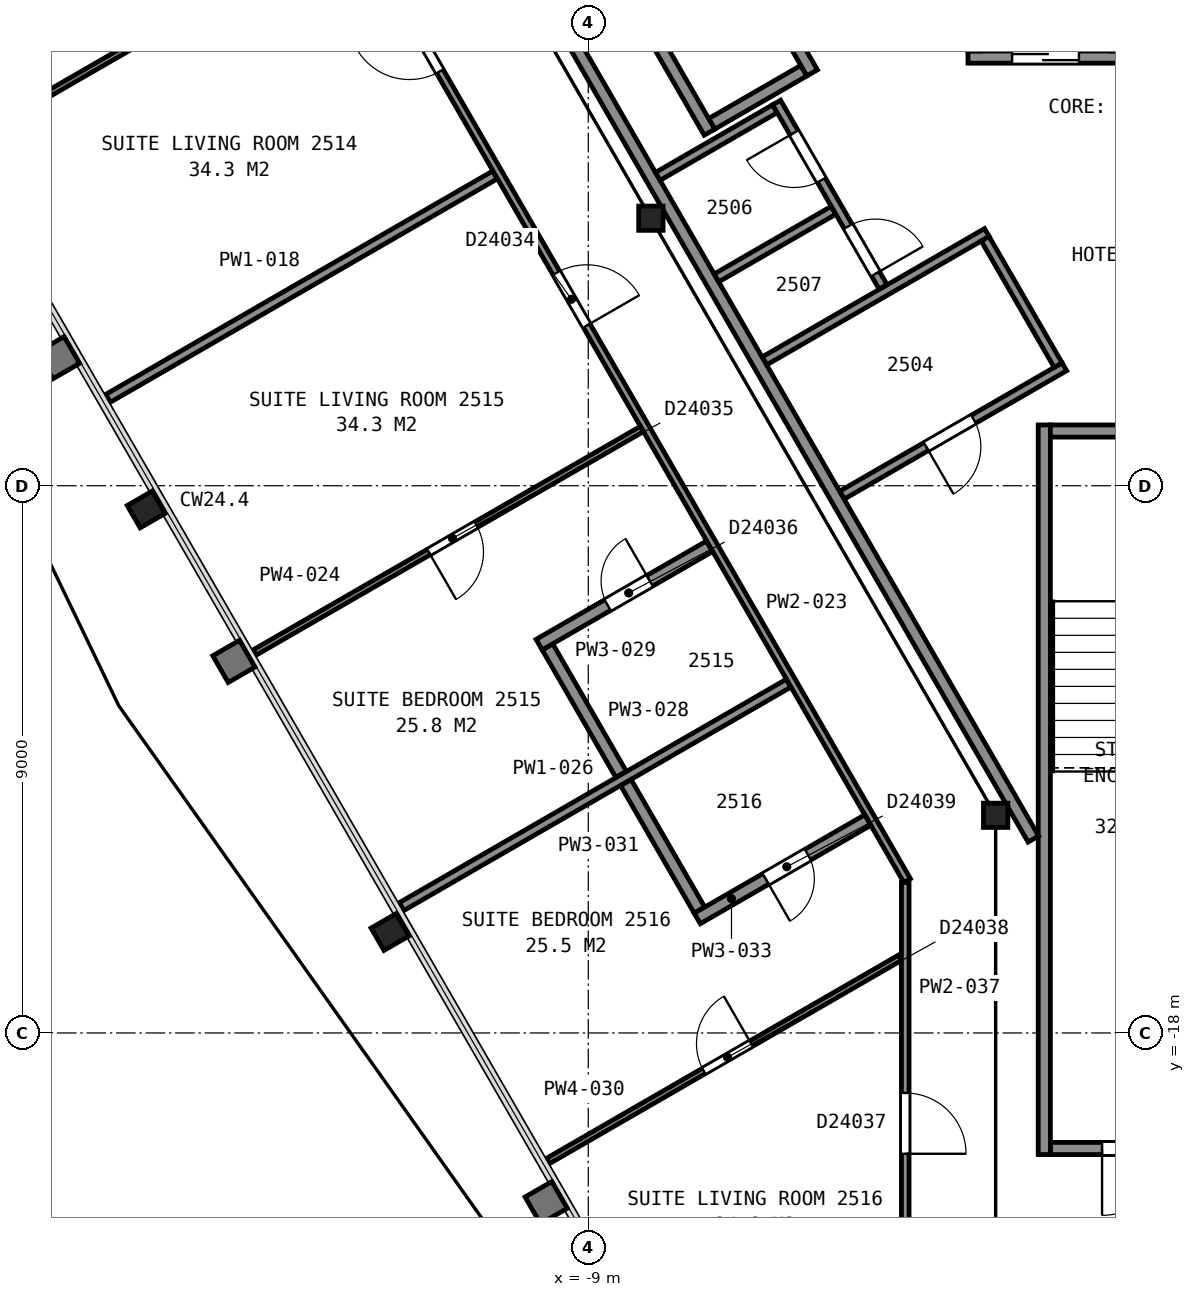
"""IFC4 building model, lengths in metres.
Left out: names, types, materials, properties, quantities, classifications, styles, units other than length and angle.
Written with IfcOpenShell. Run it as: python <this file> out.ifc"""

import sys

from ifc_helpers import new_model, si_unit, direction, frame, frame_2d, origin, origin_2d, place, context, subcontext, project, spatial, rectangle, i_section, extrude, element, fill, save


model = new_model("IFC4")
c1 = context("Model", 3, precision=1e-05, world=origin(), true_north=direction((0.0, 1.0)))
c2 = subcontext(c1, "Body", "Model", "MODEL_VIEW")
j1 = project(units=[si_unit("LENGTHUNIT", "METRE"), si_unit("PLANEANGLEUNIT", "RADIAN")], contexts=[c1])
p1 = place(None, origin())
s1 = spatial("IfcSite", under=j1, at=p1, CompositionType="ELEMENT")
p2 = place(p1, origin())
s2 = spatial("IfcBuilding", under=s1, at=p2, CompositionType="ELEMENT")
p3 = place(p2, frame((0.0, 0.0, 107.2)))
s3 = spatial("IfcBuildingStorey", under=s2, at=p3, CompositionType="ELEMENT", Elevation=107.2)
for number, where, z_axis, x_axis in (
    (1, (-16.27, -9.39, 0.0), (0.0, 0.0, 1.0), (-0.5, 0.866, 0.0)),
    (2, (-12.26, -16.34, 0.0), (0.0, 0.0, 1.0), (-0.5, 0.866, 0.0)),
):
    element("IfcColumn", number, at=place(p3, frame(where, z_axis=z_axis, x_axis=x_axis)), inside=s3, PredefinedType="COLUMN", context=c2, shape_type="SweptSolid", body=[
        extrude(i_section(OverallWidth=0.424, OverallDepth=0.475, WebThickness=0.048, FlangeThickness=0.077, FilletRadius=0.015, at=origin_2d()), origin(), (0.0, 0.0, 1.0), 3.6),
    ])
for number, where, z_axis, x_axis in (
    (3, (-7.97, -4.6, 0.0), (0.0, 0.0, 1.0), (1.0, 0.0, 0.0)),
    (4, (-2.3, -14.42, 0.0), (0.0, 0.0, 1.0), (1.0, 0.0, 0.0)),
):
    element("IfcColumn", number, at=place(p3, frame(where, z_axis=z_axis, x_axis=x_axis)), inside=s3, PredefinedType="COLUMN", context=c2, shape_type="SweptSolid", body=[
        extrude(i_section(OverallWidth=0.401, OverallDepth=0.399, WebThickness=0.025, FlangeThickness=0.04, FilletRadius=0.015, at=origin_2d()), origin(), (0.0, 0.0, 1.0), 3.6),
    ])
p4 = place(p3, frame((-1.4, -19.9, 0.0), z_axis=(0.0, 0.0, 1.0), x_axis=(1.0, 0.0, 0.0)))
e5 = element("IfcWall", 5, at=p4, inside=s3, PredefinedType="PARTITIONING", context=c2, shape_type="SweptSolid", body=[
    extrude(rectangle(XDim=2.8, YDim=0.2, at=frame_2d((1.4, 0.0))), origin(), (0.0, 0.0, 1.0), 3.35),
])
p5 = place(p4, frame((0.85, 0.0, 0.0)))
e6 = element("IfcOpeningElement", 6, at=p5, cuts=e5, PredefinedType="OPENING", context=c2, shape_type="SweptSolid", body=[
    extrude(rectangle(XDim=1.1, YDim=2.1, at=frame_2d((0.55, 1.05))), frame((0.0, 0.11, 0.0), z_axis=(0.0, -1.0, 0.0), x_axis=(1.0, 0.0, 0.0)), (0.0, 0.0, 1.0), 0.22),
])
p6 = place(p3, frame((-1.5, -8.0, 0.0), z_axis=(0.0, 0.0, 1.0), x_axis=(0.0, -1.0, 0.0)))
e7 = element("IfcWall", 7, at=p6, inside=s3, PredefinedType="PARTITIONING", context=c2, shape_type="SweptSolid", body=[
    extrude(rectangle(XDim=12.0, YDim=0.2, at=frame_2d((6.0, 0.0))), origin(), (0.0, 0.0, 1.0), 3.35),
])
p7 = place(p3, frame((-1.4, -8.1, 0.0), z_axis=(0.0, 0.0, 1.0), x_axis=(1.0, 0.0, 0.0)))
e8 = element("IfcWall", 8, at=p7, inside=s3, PredefinedType="PARTITIONING", context=c2, shape_type="SweptSolid", body=[
    extrude(rectangle(XDim=2.8, YDim=0.2, at=frame_2d((1.4, 0.0))), origin(), (0.0, 0.0, 1.0), 3.35),
])
p8 = place(p3, frame((-2.755, -1.95, 0.0), z_axis=(0.0, 0.0, 1.0), x_axis=(1.0, 0.0, 0.0)))
e9 = element("IfcWall", 9, at=p8, inside=s3, PredefinedType="PARTITIONING", context=c2, shape_type="SweptSolid", body=[
    extrude(rectangle(XDim=2.55, YDim=0.2, at=frame_2d((1.275, 0.0))), origin(), (0.0, 0.0, 1.0), 3.6),
])
p9 = place(p8, frame((0.725, 0.0, 0.0)))
e10 = element("IfcOpeningElement", 10, at=p9, cuts=e9, PredefinedType="OPENING", context=c2, shape_type="SweptSolid", body=[
    extrude(rectangle(XDim=1.1, YDim=2.1, at=frame_2d((0.55, 1.05))), frame((0.0, 0.11, 0.0), z_axis=(0.0, -1.0, 0.0), x_axis=(1.0, 0.0, 0.0)), (0.0, 0.0, 1.0), 0.22),
])
p10 = place(p3, frame((-6.97, -3.048, 0.0), z_axis=(0.0, 0.0, 1.0), x_axis=(0.866036909293, 0.499980071345, 0.0)))
e11 = element("IfcWall", 11, at=p10, inside=s3, PredefinedType="PARTITIONING", context=c2, shape_type="SweptSolid", body=[
    extrude(rectangle(XDim=1.75, YDim=0.2, at=frame_2d((0.875, 0.0))), origin(), (0.0, 0.0, 1.0), 3.6),
])
p11 = place(p3, frame((-5.318, -2.21, 0.0), z_axis=(0.0, 0.0, 1.0), x_axis=(-0.499938297808, 0.866061024631, 0.0)))
e12 = element("IfcWall", 12, at=p11, inside=s3, PredefinedType="PARTITIONING", context=c2, shape_type="SweptSolid", body=[
    extrude(rectangle(XDim=2.35, YDim=0.2, at=frame_2d((1.175, 0.0))), origin(), (0.0, 0.0, 1.0), 3.6),
])
p12 = place(p3, frame((-7.006, -3.185, 0.0), z_axis=(0.0, 0.0, 1.0), x_axis=(-0.499990435942, 0.866030925526, 0.0)))
e13 = element("IfcWall", 13, at=p12, inside=s3, PredefinedType="PARTITIONING", context=c2, shape_type="SweptSolid", body=[
    extrude(rectangle(XDim=2.55, YDim=0.2, at=frame_2d((1.275, 0.0))), origin(), (0.0, 0.0, 1.0), 3.6),
])
p13 = place(p3, frame((-13.664, 5.946, 0.0), z_axis=(0.0, 0.0, 1.0), x_axis=(0.499994327219, -0.866028678941, 0.0)))
e14 = element("IfcWall", 14, at=p13, inside=s3, PredefinedType="PARTITIONING", context=c2, shape_type="SweptSolid", body=[
    extrude(rectangle(XDim=23.968, YDim=0.2, at=frame_2d((11.984, 0.0))), origin(), (0.0, 0.0, 1.0), 3.35),
])
p14 = place(p3, frame((-7.856, -3.912, 0.0), z_axis=(0.0, 0.0, 1.0), x_axis=(0.865971748, 0.500092923031, 0.0)))
e15 = element("IfcWall", 15, at=p14, inside=s3, PredefinedType="PARTITIONING", context=c2, shape_type="SweptSolid", body=[
    extrude(rectangle(XDim=2.225, YDim=0.15, at=frame_2d((1.112, 0.0))), origin(), (0.0, 0.0, 1.0), 3.35),
])
p15 = place(p3, frame((-6.892, -5.582, 0.0), z_axis=(0.0, 0.0, 1.0), x_axis=(0.865944298464, 0.500140452231, 0.0)))
e16 = element("IfcWall", 16, at=p15, inside=s3, PredefinedType="PARTITIONING", context=c2, shape_type="SweptSolid", body=[
    extrude(rectangle(XDim=2.224, YDim=0.15, at=frame_2d((1.112, 0.0))), origin(), (0.0, 0.0, 1.0), 3.35),
])
p16 = place(p3, frame((-6.1, -6.946, 0.0), z_axis=(0.0, 0.0, 1.0), x_axis=(0.866038200431, 0.499977834903, 0.0)))
e17 = element("IfcWall", 17, at=p16, inside=s3, PredefinedType="PARTITIONING", context=c2, shape_type="SweptSolid", body=[
    extrude(rectangle(XDim=4.22, YDim=0.15, at=frame_2d((2.11, 0.0))), origin(), (0.0, 0.0, 1.0), 3.35),
])
p17 = place(p3, frame((-4.152, -5.729, 0.0), z_axis=(0.0, 0.0, 1.0), x_axis=(-0.500024287448, 0.866011380966, 0.0)))
e18 = element("IfcWall", 18, at=p17, inside=s3, PredefinedType="PARTITIONING", context=c2, shape_type="SweptSolid", body=[
    extrude(rectangle(XDim=3.501, YDim=0.15, at=frame_2d((1.75, 0.0))), origin(), (0.0, 0.0, 1.0), 3.35),
])
p18 = place(p17, frame((2.026, 0.0, 0.0)))
e19 = element("IfcOpeningElement", 19, at=p18, cuts=e18, PredefinedType="OPENING", context=c2, shape_type="SweptSolid", body=[
    extrude(rectangle(XDim=0.9, YDim=2.1, at=frame_2d((0.45, 1.05))), frame((0.0, 0.085, 0.0), z_axis=(0.0, -1.0, 0.0), x_axis=(1.0, 0.0, 0.0)), (0.0, 0.0, 1.0), 0.17),
])
p19 = place(p17, frame((0.248, 0.0, 0.0)))
e20 = element("IfcOpeningElement", 20, at=p19, cuts=e18, PredefinedType="OPENING", context=c2, shape_type="SweptSolid", body=[
    extrude(rectangle(XDim=0.9, YDim=2.1, at=frame_2d((0.45, 1.05))), frame((0.0, 0.085, 0.0), z_axis=(0.0, -1.0, 0.0), x_axis=(1.0, 0.0, 0.0)), (0.0, 0.0, 1.0), 0.17),
])
p20 = place(p3, frame((-4.825, -9.154, 0.0), z_axis=(0.0, 0.0, 1.0), x_axis=(0.866023738697, 0.500002884005, 0.0)))
e21 = element("IfcWall", 21, at=p20, inside=s3, PredefinedType="PARTITIONING", context=c2, shape_type="SweptSolid", body=[
    extrude(rectangle(XDim=4.22, YDim=0.15, at=frame_2d((2.11, 0.0))), origin(), (0.0, 0.0, 1.0), 3.35),
])
p21 = place(p20, frame((1.595, 0.0, 0.0)))
e22 = element("IfcOpeningElement", 22, at=p21, cuts=e21, PredefinedType="OPENING", context=c2, shape_type="SweptSolid", body=[
    extrude(rectangle(XDim=0.9, YDim=2.1, at=frame_2d((0.45, 1.05))), frame((0.0, 0.085, 0.0), z_axis=(0.0, -1.0, 0.0), x_axis=(1.0, 0.0, 0.0)), (0.0, 0.0, 1.0), 0.17),
])
p22 = place(p3, frame((-2.472, -4.938, 0.0), z_axis=(0.0, 0.0, 1.0), x_axis=(0.500045362686, -0.865999212041, 0.0)))
e23 = element("IfcWall", 23, at=p22, inside=s3, PredefinedType="PARTITIONING", context=c2, shape_type="SweptSolid", body=[
    extrude(rectangle(XDim=2.4, YDim=0.15, at=frame_2d((1.2, 0.0))), origin(), (0.0, 0.0, 1.0), 3.35),
])
p23 = place(p3, frame((-19.311, -3.382, 0.0), z_axis=(0.0, 0.0, 1.0), x_axis=(0.865995225926, 0.500052265941, 0.0)))
e24 = element("IfcWall", 24, at=p23, inside=s3, PredefinedType="PARTITIONING", context=c2, shape_type="SweptSolid", body=[
    extrude(rectangle(XDim=7.347, YDim=0.1, at=frame_2d((3.674, 0.0))), origin(), (0.0, 0.0, 1.0), 2.613),
])
p24 = place(p23, frame((3.303, 0.0, 0.0)))
e25 = element("IfcOpeningElement", 25, at=p24, cuts=e24, PredefinedType="OPENING", context=c2, shape_type="SweptSolid", body=[
    extrude(rectangle(XDim=0.9, YDim=2.1, at=frame_2d((0.45, 1.05))), frame((0.0, 0.06, 0.0), z_axis=(0.0, -1.0, 0.0), x_axis=(1.0, 0.0, 0.0)), (0.0, 0.0, 1.0), 0.12),
])
p25 = place(p3, frame((-16.898, -7.562, 0.0), z_axis=(0.0, 0.0, 1.0), x_axis=(0.866055004685, 0.499948726231, 0.0)))
e26 = element("IfcWall", 26, at=p25, inside=s3, PredefinedType="PARTITIONING", context=c2, shape_type="SweptSolid", body=[
    extrude(rectangle(XDim=7.347, YDim=0.15, at=frame_2d((3.674, 0.0))), origin(), (0.0, 0.0, 1.0), 2.613),
])
p26 = place(p3, frame((-3.756, -15.494, 0.0), z_axis=(0.0, 0.0, 1.0), x_axis=(-0.500027787016, 0.866009360349, 0.0)))
e27 = element("IfcWall", 27, at=p26, inside=s3, PredefinedType="PARTITIONING", context=c2, shape_type="SweptSolid", body=[
    extrude(rectangle(XDim=23.856, YDim=0.125, at=frame_2d((11.928, 0.0))), origin(), (0.0, 0.0, 1.0), 2.613),
])
p27 = place(p26, frame((15.368, 0.0, 0.0)))
e28 = element("IfcOpeningElement", 28, at=p27, cuts=e27, PredefinedType="OPENING", context=c2, shape_type="SweptSolid", body=[
    extrude(rectangle(XDim=1.0, YDim=2.1, at=frame_2d((0.5, 1.05))), frame((0.0, 0.073, 0.0), z_axis=(0.0, -1.0, 0.0), x_axis=(1.0, 0.0, 0.0)), (0.0, 0.0, 1.0), 0.145),
])
p28 = place(p26, frame((10.54, 0.0, 0.0)))
e29 = element("IfcOpeningElement", 29, at=p28, cuts=e27, PredefinedType="OPENING", context=c2, shape_type="SweptSolid", body=[
    extrude(rectangle(XDim=1.0, YDim=2.1, at=frame_2d((0.5, 1.05))), frame((0.0, 0.073, 0.0), z_axis=(0.0, -1.0, 0.0), x_axis=(1.0, 0.0, 0.0)), (0.0, 0.0, 1.0), 0.145),
])
p29 = place(p3, frame((-8.117, -8.066, 0.0), z_axis=(0.0, 0.0, 1.0), x_axis=(-0.866052324842, -0.499953368461, 0.0)))
e30 = element("IfcWall", 30, at=p29, inside=s3, PredefinedType="PARTITIONING", context=c2, shape_type="SweptSolid", body=[
    extrude(rectangle(XDim=7.352, YDim=0.1, at=frame_2d((3.676, 0.0))), origin(), (0.0, 0.0, 1.0), 2.613),
])
p30 = place(p29, frame((3.148, 0.0, 0.0)))
e31 = element("IfcOpeningElement", 31, at=p30, cuts=e30, PredefinedType="OPENING", context=c2, shape_type="SweptSolid", body=[
    extrude(rectangle(XDim=0.9, YDim=2.1, at=frame_2d((0.45, 1.05))), frame((0.0, 0.06, 0.0), z_axis=(0.0, -1.0, 0.0), x_axis=(1.0, 0.0, 0.0)), (0.0, 0.0, 1.0), 0.12),
])
p31 = place(p3, frame((-12.071, -15.922, 0.0), z_axis=(0.0, 0.0, 1.0), x_axis=(0.866063309627, 0.499934339407, 0.0)))
e32 = element("IfcWall", 32, at=p31, inside=s3, PredefinedType="PARTITIONING", context=c2, shape_type="SweptSolid", body=[
    extrude(rectangle(XDim=7.348, YDim=0.15, at=frame_2d((3.674, 0.0))), origin(), (0.0, 0.0, 1.0), 2.613),
])
p32 = place(p3, frame((-9.671, -11.65, 0.0), z_axis=(0.0, 0.0, 1.0), x_axis=(0.50002218001, -0.866012597771, 0.0)))
e33 = element("IfcWall", 33, at=p32, inside=s3, PredefinedType="PARTITIONING", context=c2, shape_type="SweptSolid", body=[
    extrude(rectangle(XDim=2.421, YDim=0.2, at=frame_2d((1.21, 0.0))), origin(), (0.0, 0.0, 1.0), 2.613),
])
p33 = place(p3, frame((-7.008, -9.997, 0.0), z_axis=(0.0, 0.0, 1.0), x_axis=(-0.866078705744, -0.499907666931, 0.0)))
e34 = element("IfcWall", 34, at=p33, inside=s3, PredefinedType="PARTITIONING", context=c2, shape_type="SweptSolid", body=[
    extrude(rectangle(XDim=3.233, YDim=0.2, at=frame_2d((1.616, 0.0))), origin(), (0.0, 0.0, 1.0), 2.613),
])
p34 = place(p33, frame((1.133, 0.0, 0.0)))
e35 = element("IfcOpeningElement", 35, at=p34, cuts=e34, PredefinedType="OPENING", context=c2, shape_type="SweptSolid", body=[
    extrude(rectangle(XDim=0.8, YDim=2.1, at=frame_2d((0.4, 1.05))), frame((0.0, 0.11, 0.0), z_axis=(0.0, -1.0, 0.0), x_axis=(1.0, 0.0, 0.0)), (0.0, 0.0, 1.0), 0.22),
])
p35 = place(p3, frame((-9.657, -20.103, 0.0), z_axis=(0.0, 0.0, 1.0), x_axis=(0.865979781901, 0.500079011097, 0.0)))
e36 = element("IfcWall", 36, at=p35, inside=s3, PredefinedType="PARTITIONING", context=c2, shape_type="SweptSolid", body=[
    extrude(rectangle(XDim=6.678, YDim=0.1, at=frame_2d((3.339, 0.0))), origin(), (0.0, 0.0, 1.0), 2.613),
])
p36 = place(p35, frame((2.953, 0.0, 0.0)))
e37 = element("IfcOpeningElement", 37, at=p36, cuts=e36, PredefinedType="OPENING", context=c2, shape_type="SweptSolid", body=[
    extrude(rectangle(XDim=0.9, YDim=2.1, at=frame_2d((0.45, 1.05))), frame((0.0, 0.06, 0.0), z_axis=(0.0, -1.0, 0.0), x_axis=(1.0, 0.0, 0.0)), (0.0, 0.0, 1.0), 0.12),
])
p37 = place(p3, frame((-8.381, -13.884, 0.0), z_axis=(0.0, 0.0, 1.0), x_axis=(0.499795219151, -0.866143601786, 0.0)))
e38 = element("IfcWall", 38, at=p37, inside=s3, PredefinedType="PARTITIONING", context=c2, shape_type="SweptSolid", body=[
    extrude(rectangle(XDim=2.42, YDim=0.2, at=frame_2d((1.21, 0.0))), origin(), (0.0, 0.0, 1.0), 2.613),
])
p38 = place(p3, frame((-7.208, -16.117, 0.0), z_axis=(0.0, 0.0, 1.0), x_axis=(0.866091428368, 0.499885624626, 0.0)))
e39 = element("IfcWall", 39, at=p38, inside=s3, PredefinedType="PARTITIONING", context=c2, shape_type="SweptSolid", body=[
    extrude(rectangle(XDim=3.238, YDim=0.2, at=frame_2d((1.619, 0.0))), origin(), (0.0, 0.0, 1.0), 2.613),
])
p39 = place(p38, frame((1.3, 0.0, 0.0)))
e40 = element("IfcOpeningElement", 40, at=p39, cuts=e39, PredefinedType="OPENING", context=c2, shape_type="SweptSolid", body=[
    extrude(rectangle(XDim=0.8, YDim=2.1, at=frame_2d((0.4, 1.05))), frame((0.0, 0.11, 0.0), z_axis=(0.0, -1.0, 0.0), x_axis=(1.0, 0.0, 0.0)), (0.0, 0.0, 1.0), 0.22),
])
p40 = place(p3, frame((-3.787, -22.722, 0.0), z_axis=(0.0, 0.0, 1.0), x_axis=(0.0, 1.0, 0.0)))
e41 = element("IfcWall", 41, at=p40, inside=s3, PredefinedType="PARTITIONING", context=c2, shape_type="SweptSolid", body=[
    extrude(rectangle(XDim=7.197, YDim=0.125, at=frame_2d((3.599, 0.0))), origin(), (0.0, 0.0, 1.0), 2.613),
])
p41 = place(p40, frame((2.735, 0.0, 0.0)))
e42 = element("IfcOpeningElement", 42, at=p41, cuts=e41, PredefinedType="OPENING", context=c2, shape_type="SweptSolid", body=[
    extrude(rectangle(XDim=1.0, YDim=2.1, at=frame_2d((0.5, 1.05))), frame((0.0, 0.073, 0.0), z_axis=(0.0, -1.0, 0.0), x_axis=(1.0, 0.0, 0.0)), (0.0, 0.0, 1.0), 0.145),
])
p42 = place(p5, origin())
e43 = element("IfcDoor", 43, at=p42, inside=s3, OperationType="SINGLE_SWING_LEFT", PredefinedType="DOOR", context=c2, shape_type="SweptSolid", body=[
    extrude(rectangle(XDim=1.1, YDim=2.1, at=frame_2d((0.55, 1.05))), frame((0.0, 0.025, 0.0), z_axis=(0.0, -1.0, 0.0), x_axis=(1.0, 0.0, 0.0)), (0.0, 0.0, 1.0), 0.05),
])
fill(e6, e43)
p43 = place(p9, origin())
e44 = element("IfcDoor", 44, at=p43, inside=s3, OperationType="SLIDING_TO_RIGHT", PredefinedType="DOOR", context=c2, shape_type="SweptSolid", body=[
    extrude(rectangle(XDim=1.1, YDim=2.1, at=frame_2d((0.55, 1.05))), frame((0.0, 0.025, 0.0), z_axis=(0.0, -1.0, 0.0), x_axis=(1.0, 0.0, 0.0)), (0.0, 0.0, 1.0), 0.05),
])
fill(e10, e44)
p44 = place(p18, origin())
e45 = element("IfcDoor", 45, at=p44, inside=s3, OperationType="SINGLE_SWING_RIGHT", PredefinedType="DOOR", context=c2, shape_type="SweptSolid", body=[
    extrude(rectangle(XDim=0.9, YDim=2.1, at=frame_2d((0.45, 1.05))), frame((0.0, 0.025, 0.0), z_axis=(0.0, -1.0, 0.0), x_axis=(1.0, 0.0, 0.0)), (0.0, 0.0, 1.0), 0.05),
])
fill(e19, e45)
p45 = place(p19, origin())
e46 = element("IfcDoor", 46, at=p45, inside=s3, OperationType="SINGLE_SWING_LEFT", PredefinedType="DOOR", context=c2, shape_type="SweptSolid", body=[
    extrude(rectangle(XDim=0.9, YDim=2.1, at=frame_2d((0.45, 1.05))), frame((0.0, 0.025, 0.0), z_axis=(0.0, -1.0, 0.0), x_axis=(1.0, 0.0, 0.0)), (0.0, 0.0, 1.0), 0.05),
])
fill(e20, e46)
p46 = place(p21, origin())
e47 = element("IfcDoor", 47, at=p46, inside=s3, OperationType="SINGLE_SWING_LEFT", PredefinedType="DOOR", context=c2, shape_type="SweptSolid", body=[
    extrude(rectangle(XDim=0.9, YDim=2.1, at=frame_2d((0.45, 1.05))), frame((0.0, 0.025, 0.0), z_axis=(0.0, -1.0, 0.0), x_axis=(1.0, 0.0, 0.0)), (0.0, 0.0, 1.0), 0.05),
])
fill(e22, e47)
p47 = place(p27, origin())
e48 = element("IfcDoor", 48, at=p47, inside=s3, OperationType="SINGLE_SWING_RIGHT", PredefinedType="DOOR", context=c2, shape_type="SweptSolid", body=[
    extrude(rectangle(XDim=1.0, YDim=2.1, at=frame_2d((0.5, 1.05))), frame((0.0, 0.025, 0.0), z_axis=(0.0, -1.0, 0.0), x_axis=(1.0, 0.0, 0.0)), (0.0, 0.0, 1.0), 0.05),
])
fill(e28, e48)
p48 = place(p28, origin())
e49 = element("IfcDoor", 49, at=p48, inside=s3, OperationType="SINGLE_SWING_LEFT", PredefinedType="DOOR", context=c2, shape_type="SweptSolid", body=[
    extrude(rectangle(XDim=1.0, YDim=2.1, at=frame_2d((0.5, 1.05))), frame((0.0, 0.025, 0.0), z_axis=(0.0, -1.0, 0.0), x_axis=(1.0, 0.0, 0.0)), (0.0, 0.0, 1.0), 0.05),
])
fill(e29, e49)
p49 = place(p30, origin())
e50 = element("IfcDoor", 50, at=p49, inside=s3, OperationType="SINGLE_SWING_RIGHT", PredefinedType="DOOR", context=c2, shape_type="SweptSolid", body=[
    extrude(rectangle(XDim=0.9, YDim=2.1, at=frame_2d((0.45, 1.05))), frame((0.0, 0.025, 0.0), z_axis=(0.0, -1.0, 0.0), x_axis=(1.0, 0.0, 0.0)), (0.0, 0.0, 1.0), 0.05),
])
fill(e31, e50)
p50 = place(p34, origin())
e51 = element("IfcDoor", 51, at=p50, inside=s3, OperationType="SINGLE_SWING_LEFT", PredefinedType="DOOR", context=c2, shape_type="SweptSolid", body=[
    extrude(rectangle(XDim=0.8, YDim=2.1, at=frame_2d((0.4, 1.05))), frame((0.0, 0.025, 0.0), z_axis=(0.0, -1.0, 0.0), x_axis=(1.0, 0.0, 0.0)), (0.0, 0.0, 1.0), 0.05),
])
fill(e35, e51)
p51 = place(p36, origin())
e52 = element("IfcDoor", 52, at=p51, inside=s3, OperationType="SINGLE_SWING_RIGHT", PredefinedType="DOOR", context=c2, shape_type="SweptSolid", body=[
    extrude(rectangle(XDim=0.9, YDim=2.1, at=frame_2d((0.45, 1.05))), frame((0.0, 0.025, 0.0), z_axis=(0.0, -1.0, 0.0), x_axis=(1.0, 0.0, 0.0)), (0.0, 0.0, 1.0), 0.05),
])
fill(e37, e52)
p52 = place(p39, origin())
e53 = element("IfcDoor", 53, at=p52, inside=s3, OperationType="SINGLE_SWING_LEFT", PredefinedType="DOOR", context=c2, shape_type="SweptSolid", body=[
    extrude(rectangle(XDim=0.8, YDim=2.1, at=frame_2d((0.4, 1.05))), frame((0.0, 0.025, 0.0), z_axis=(0.0, -1.0, 0.0), x_axis=(1.0, 0.0, 0.0)), (0.0, 0.0, 1.0), 0.05),
])
fill(e40, e53)
p53 = place(p41, origin())
e54 = element("IfcDoor", 54, at=p53, inside=s3, OperationType="SINGLE_SWING_LEFT", PredefinedType="DOOR", context=c2, shape_type="SweptSolid", body=[
    extrude(rectangle(XDim=1.0, YDim=2.1, at=frame_2d((0.5, 1.05))), frame((0.0, 0.025, 0.0), z_axis=(0.0, -1.0, 0.0), x_axis=(1.0, 0.0, 0.0)), (0.0, 0.0, 1.0), 0.05),
])
fill(e42, e54)
save(model, sys.argv[1])
